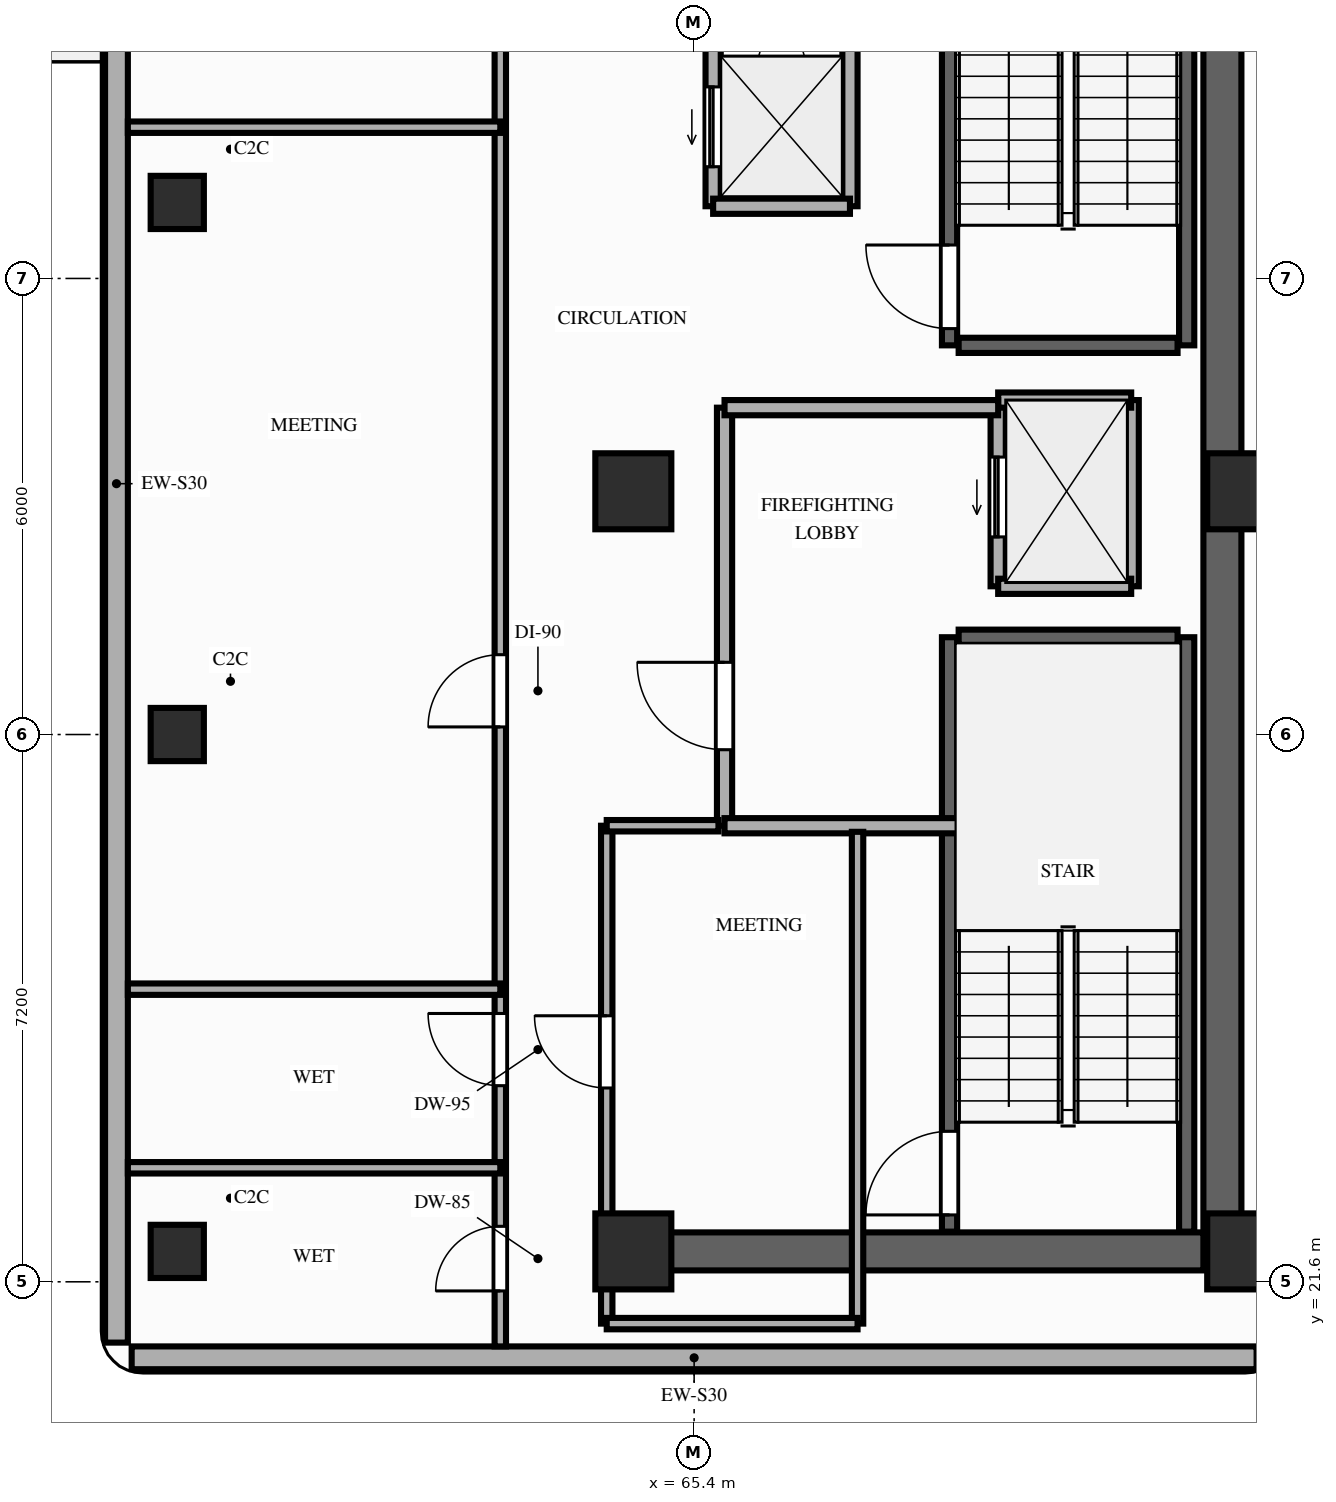
"""IFC4 building model, lengths in metres.
Left out: names, types, materials, properties, quantities, classifications, styles, units other than length and angle.
Written with IfcOpenShell. Run it as: python <this file> out.ifc"""

import sys

from ifc_helpers import new_model, si_unit, direction, frame, frame_2d, origin, origin_2d, place, context, subcontext, project, spatial, rectangle, extrude, element, fill, save


model = new_model("IFC4")
c1 = context("Model", 3, precision=1e-05, world=origin(), true_north=direction((0.0, 1.0)))
c2 = subcontext(c1, "Body", "Model", "MODEL_VIEW")
j1 = project(units=[si_unit("LENGTHUNIT", "METRE"), si_unit("PLANEANGLEUNIT", "RADIAN")], contexts=[c1])
p1 = place(None, origin())
s1 = spatial("IfcSite", under=j1, at=p1, CompositionType="ELEMENT")
p2 = place(p1, origin())
s2 = spatial("IfcBuilding", under=s1, at=p2, CompositionType="ELEMENT")
p3 = place(p2, frame((0.0, 0.0, 89.8)))
s3 = spatial("IfcBuildingStorey", under=s2, at=p3, CompositionType="ELEMENT", Elevation=89.8)
for number, where, z_axis, x_axis in (
    (1, (64.6, 22.0, 0.0), (0.0, 0.0, 1.0), (1.0, 0.0, 0.0)),
    (2, (72.65, 22.0, 0.0), (0.0, 0.0, 1.0), (1.0, 0.0, 0.0)),
    (3, (64.6, 32.0, 0.0), (0.0, 0.0, 1.0), (1.0, 0.0, 0.0)),
    (4, (72.65, 32.0, 0.0), (0.0, 0.0, 1.0), (1.0, 0.0, 0.0)),
):
    element("IfcColumn", number, at=place(p3, frame(where, z_axis=z_axis, x_axis=x_axis)), inside=s3, PredefinedType="COLUMN", context=c2, shape_type="SweptSolid", body=[
        extrude(rectangle(XDim=1.0, YDim=1.0, at=origin_2d()), origin(), (0.0, 0.0, 1.0), 3.2),
    ])
for number, where, z_axis, x_axis in (
    (5, (58.6, 22.0, 0.0), (0.0, 0.0, 1.0), (1.0, 0.0, 0.0)),
    (6, (58.6, 28.8, 0.0), (0.0, 0.0, 1.0), (1.0, 0.0, 0.0)),
    (7, (58.6, 35.8, 0.0), (0.0, 0.0, 1.0), (1.0, 0.0, 0.0)),
):
    element("IfcColumn", number, at=place(p3, frame(where, z_axis=z_axis, x_axis=x_axis)), inside=s3, PredefinedType="COLUMN", context=c2, shape_type="SweptSolid", body=[
        extrude(rectangle(XDim=0.7, YDim=0.7, at=origin_2d()), origin(), (0.0, 0.0, 1.0), 3.2),
    ])
p4 = place(p3, frame((57.8, 43.4, 0.0), z_axis=(0.0, 0.0, 1.0), x_axis=(0.0, -1.0, 0.0)))
e8 = element("IfcWall", 8, at=p4, inside=s3, PredefinedType="STANDARD", context=c2, shape_type="SweptSolid", body=[
    extrude(rectangle(XDim=22.6, YDim=0.3, at=frame_2d((11.3, 0.0))), origin(), (0.0, 0.0, 1.0), 2.73),
])
p5 = place(p4, frame((3.7, 0.0, 0.0)))
e9 = element("IfcOpeningElement", 9, at=p5, cuts=e8, PredefinedType="OPENING", context=c2, shape_type="SweptSolid", body=[
    extrude(rectangle(XDim=1.4, YDim=2.1, at=frame_2d((0.7, 1.05))), frame((0.0, 0.16, 0.0), z_axis=(0.0, -1.0, 0.0), x_axis=(1.0, 0.0, 0.0)), (0.0, 0.0, 1.0), 0.32),
])
p6 = place(p3, frame((58.0, 20.6, 0.0), z_axis=(0.0, 0.0, 1.0), x_axis=(1.0, 0.0, 0.0)))
e10 = element("IfcWall", 10, at=p6, inside=s3, PredefinedType="STANDARD", context=c2, shape_type="SweptSolid", body=[
    extrude(rectangle(XDim=14.8, YDim=0.3, at=frame_2d((7.4, 0.0))), origin(), (0.0, 0.0, 1.0), 3.02),
])
p7 = place(p3, frame((72.35, 22.0, 0.0), z_axis=(0.0, 0.0, 1.0), x_axis=(0.0, 1.0, 0.0)))
e11 = element("IfcWall", 11, at=p7, inside=s3, PredefinedType="SHEAR", context=c2, shape_type="SweptSolid", body=[
    extrude(rectangle(XDim=20.25, YDim=0.5, at=frame_2d((10.125, 0.0))), origin(), (0.0, 0.0, 1.0), 3.02),
])
p8 = place(p3, frame((64.6, 22.0, 0.0), z_axis=(0.0, 0.0, 1.0), x_axis=(1.0, 0.0, 0.0)))
e12 = element("IfcWall", 12, at=p8, inside=s3, PredefinedType="SHEAR", context=c2, shape_type="SweptSolid", body=[
    extrude(rectangle(XDim=7.5, YDim=0.5, at=frame_2d((3.75, 0.0))), origin(), (0.0, 0.0, 1.0), 3.02),
])
p9 = place(p3, frame((68.76, 22.26, 0.0), z_axis=(0.0, 0.0, 1.0), x_axis=(0.0, 1.0, 0.0)))
e13 = element("IfcWall", 13, at=p9, inside=s3, PredefinedType="SHEAR", context=c2, shape_type="SweptSolid", body=[
    extrude(rectangle(XDim=7.82, YDim=0.2, at=frame_2d((3.91, 0.0))), origin(), (0.0, 0.0, 1.0), 3.02),
])
p10 = place(p9, frame((0.22, 0.0, 0.0)))
e14 = element("IfcOpeningElement", 14, at=p10, cuts=e13, PredefinedType="OPENING", context=c2, shape_type="SweptSolid", body=[
    extrude(rectangle(XDim=1.1, YDim=2.15, at=frame_2d((0.55, 1.075))), frame((0.0, 0.11, 0.0), z_axis=(0.0, -1.0, 0.0), x_axis=(1.0, 0.0, 0.0)), (0.0, 0.0, 1.0), 0.22),
])
p11 = place(p3, frame((71.88, 22.26, 0.0), z_axis=(0.0, 0.0, 1.0), x_axis=(0.0, 1.0, 0.0)))
e15 = element("IfcWall", 15, at=p11, inside=s3, PredefinedType="SHEAR", context=c2, shape_type="SweptSolid", body=[
    extrude(rectangle(XDim=7.82, YDim=0.2, at=frame_2d((3.91, 0.0))), origin(), (0.0, 0.0, 1.0), 3.02),
])
p12 = place(p3, frame((68.88, 30.08, 0.0), z_axis=(0.0, 0.0, 1.0), x_axis=(1.0, 0.0, 0.0)))
e16 = element("IfcWall", 16, at=p12, inside=s3, PredefinedType="SHEAR", context=c2, shape_type="SweptSolid", body=[
    extrude(rectangle(XDim=2.88, YDim=0.2, at=frame_2d((1.44, 0.0))), origin(), (0.0, 0.0, 1.0), 3.02),
])
p13 = place(p3, frame((68.76, 33.92, 0.0), z_axis=(0.0, 0.0, 1.0), x_axis=(0.0, 1.0, 0.0)))
e17 = element("IfcWall", 17, at=p13, inside=s3, PredefinedType="SHEAR", context=c2, shape_type="SweptSolid", body=[
    extrude(rectangle(XDim=7.96, YDim=0.2, at=frame_2d((3.98, 0.0))), origin(), (0.0, 0.0, 1.0), 3.02),
])
p14 = place(p13, frame((0.22, 0.0, 0.0)))
e18 = element("IfcOpeningElement", 18, at=p14, cuts=e17, PredefinedType="OPENING", context=c2, shape_type="SweptSolid", body=[
    extrude(rectangle(XDim=1.1, YDim=2.15, at=frame_2d((0.55, 1.075))), frame((0.0, 0.11, 0.0), z_axis=(0.0, -1.0, 0.0), x_axis=(1.0, 0.0, 0.0)), (0.0, 0.0, 1.0), 0.22),
])
p15 = place(p3, frame((71.88, 33.92, 0.0), z_axis=(0.0, 0.0, 1.0), x_axis=(0.0, 1.0, 0.0)))
e19 = element("IfcWall", 19, at=p15, inside=s3, PredefinedType="SHEAR", context=c2, shape_type="SweptSolid", body=[
    extrude(rectangle(XDim=7.96, YDim=0.2, at=frame_2d((3.98, 0.0))), origin(), (0.0, 0.0, 1.0), 3.02),
])
p16 = place(p3, frame((68.88, 33.92, 0.0), z_axis=(0.0, 0.0, 1.0), x_axis=(1.0, 0.0, 0.0)))
e20 = element("IfcWall", 20, at=p16, inside=s3, PredefinedType="SHEAR", context=c2, shape_type="SweptSolid", body=[
    extrude(rectangle(XDim=2.88, YDim=0.2, at=frame_2d((1.44, 0.0))), origin(), (0.0, 0.0, 1.0), 3.02),
])
p17 = place(p3, frame((65.65, 35.75, 0.0), z_axis=(0.0, 0.0, 1.0), x_axis=(0.0, 1.0, 0.0)))
e21 = element("IfcWall", 21, at=p17, inside=s3, PredefinedType="MOVABLE", context=c2, shape_type="SweptSolid", body=[
    extrude(rectangle(XDim=6.05, YDim=0.2, at=frame_2d((3.025, 0.0))), origin(), (0.0, 0.0, 1.0), 3.02),
])
p18 = place(p17, frame((0.52, 0.0, 0.0)))
e22 = element("IfcOpeningElement", 22, at=p18, cuts=e21, PredefinedType="OPENING", context=c2, shape_type="SweptSolid", body=[
    extrude(rectangle(XDim=1.05, YDim=2.15, at=frame_2d((0.525, 1.075))), frame((0.0, 0.11, 0.0), z_axis=(0.0, -1.0, 0.0), x_axis=(1.0, 0.0, 0.0)), (0.0, 0.0, 1.0), 0.22),
])
p19 = place(p17, frame((2.48, 0.0, 0.0)))
e23 = element("IfcOpeningElement", 23, at=p19, cuts=e21, PredefinedType="OPENING", context=c2, shape_type="SweptSolid", body=[
    extrude(rectangle(XDim=1.05, YDim=2.15, at=frame_2d((0.525, 1.075))), frame((0.0, 0.11, 0.0), z_axis=(0.0, -1.0, 0.0), x_axis=(1.0, 0.0, 0.0)), (0.0, 0.0, 1.0), 0.22),
])
p20 = place(p17, frame((4.43, 0.0, 0.0)))
e24 = element("IfcOpeningElement", 24, at=p20, cuts=e21, PredefinedType="OPENING", context=c2, shape_type="SweptSolid", body=[
    extrude(rectangle(XDim=1.05, YDim=2.15, at=frame_2d((0.525, 1.075))), frame((0.0, 0.11, 0.0), z_axis=(0.0, -1.0, 0.0), x_axis=(1.0, 0.0, 0.0)), (0.0, 0.0, 1.0), 0.22),
])
p21 = place(p3, frame((67.45, 35.75, 0.0), z_axis=(0.0, 0.0, 1.0), x_axis=(0.0, 1.0, 0.0)))
e25 = element("IfcWall", 25, at=p21, inside=s3, PredefinedType="MOVABLE", context=c2, shape_type="SweptSolid", body=[
    extrude(rectangle(XDim=6.05, YDim=0.2, at=frame_2d((3.025, 0.0))), origin(), (0.0, 0.0, 1.0), 3.02),
])
p22 = place(p3, frame((65.65, 35.75, 0.0), z_axis=(0.0, 0.0, 1.0), x_axis=(1.0, 0.0, 0.0)))
e26 = element("IfcWall", 26, at=p22, inside=s3, PredefinedType="MOVABLE", context=c2, shape_type="SweptSolid", body=[
    extrude(rectangle(XDim=1.8, YDim=0.2, at=frame_2d((0.9, 0.0))), origin(), (0.0, 0.0, 1.0), 3.02),
])
p23 = place(p3, frame((69.4, 30.75, 0.0), z_axis=(0.0, 0.0, 1.0), x_axis=(0.0, 1.0, 0.0)))
e27 = element("IfcWall", 27, at=p23, inside=s3, PredefinedType="MOVABLE", context=c2, shape_type="SweptSolid", body=[
    extrude(rectangle(XDim=2.45, YDim=0.2, at=frame_2d((1.225, 0.0))), origin(), (0.0, 0.0, 1.0), 3.02),
])
p24 = place(p23, frame((0.65, 0.0, 0.0)))
e28 = element("IfcOpeningElement", 28, at=p24, cuts=e27, PredefinedType="OPENING", context=c2, shape_type="SweptSolid", body=[
    extrude(rectangle(XDim=1.05, YDim=2.15, at=frame_2d((0.525, 1.075))), frame((0.0, 0.11, 0.0), z_axis=(0.0, -1.0, 0.0), x_axis=(1.0, 0.0, 0.0)), (0.0, 0.0, 1.0), 0.22),
])
p25 = place(p3, frame((71.15, 30.75, 0.0), z_axis=(0.0, 0.0, 1.0), x_axis=(0.0, 1.0, 0.0)))
e29 = element("IfcWall", 29, at=p25, inside=s3, PredefinedType="MOVABLE", context=c2, shape_type="SweptSolid", body=[
    extrude(rectangle(XDim=2.45, YDim=0.2, at=frame_2d((1.225, 0.0))), origin(), (0.0, 0.0, 1.0), 3.02),
])
for number, where, z_axis, x_axis in (
    (30, (69.4, 33.2, 0.0), (0.0, 0.0, 1.0), (1.0, 0.0, 0.0)),
    (31, (69.4, 30.75, 0.0), (0.0, 0.0, 1.0), (1.0, 0.0, 0.0)),
):
    element("IfcWall", number, at=place(p3, frame(where, z_axis=z_axis, x_axis=x_axis)), inside=s3, PredefinedType="MOVABLE", context=c2, shape_type="SweptSolid", body=[
        extrude(rectangle(XDim=1.75, YDim=0.2, at=frame_2d((0.875, 0.0))), origin(), (0.0, 0.0, 1.0), 3.02),
    ])
p26 = place(p3, frame((65.8, 27.6, 0.0), z_axis=(0.0, 0.0, 1.0), x_axis=(0.0, 1.0, 0.0)))
e32 = element("IfcWall", 32, at=p26, inside=s3, PredefinedType="PARTITIONING", context=c2, shape_type="SweptSolid", body=[
    extrude(rectangle(XDim=5.5, YDim=0.2, at=frame_2d((2.75, 0.0))), origin(), (0.0, 0.0, 1.0), 3.02),
])
p27 = place(p26, frame((1.0, 0.0, 0.0)))
e33 = element("IfcOpeningElement", 33, at=p27, cuts=e32, PredefinedType="OPENING", context=c2, shape_type="SweptSolid", body=[
    extrude(rectangle(XDim=1.15, YDim=2.15, at=frame_2d((0.575, 1.075))), frame((0.0, 0.11, 0.0), z_axis=(0.0, -1.0, 0.0), x_axis=(1.0, 0.0, 0.0)), (0.0, 0.0, 1.0), 0.22),
])
p28 = place(p3, frame((65.8, 33.1, 0.0), z_axis=(0.0, 0.0, 1.0), x_axis=(1.0, 0.0, 0.0)))
e34 = element("IfcWall", 34, at=p28, inside=s3, PredefinedType="PARTITIONING", context=c2, shape_type="SweptSolid", body=[
    extrude(rectangle(XDim=3.6, YDim=0.2, at=frame_2d((1.8, 0.0))), origin(), (0.0, 0.0, 1.0), 3.02),
])
p29 = place(p3, frame((65.8, 27.6, 0.0), z_axis=(0.0, 0.0, 1.0), x_axis=(1.0, 0.0, 0.0)))
e35 = element("IfcWall", 35, at=p29, inside=s3, PredefinedType="PARTITIONING", context=c2, shape_type="SweptSolid", body=[
    extrude(rectangle(XDim=3.4, YDim=0.2, at=frame_2d((1.7, 0.0))), origin(), (0.0, 0.0, 1.0), 3.02),
])
p30 = place(p3, frame((64.25, 21.05, 0.0), z_axis=(0.0, 0.0, 1.0), x_axis=(0.0, 1.0, 0.0)))
e36 = element("IfcWall", 36, at=p30, inside=s3, PredefinedType="PARTITIONING", context=c2, shape_type="SweptSolid", body=[
    extrude(rectangle(XDim=6.55, YDim=0.15, at=frame_2d((3.275, 0.0))), origin(), (0.0, 0.0, 1.0), 2.61),
])
p31 = place(p30, frame((3.1, 0.0, 0.0)))
e37 = element("IfcOpeningElement", 37, at=p31, cuts=e36, PredefinedType="OPENING", context=c2, shape_type="SweptSolid", body=[
    extrude(rectangle(XDim=0.95, YDim=2.15, at=frame_2d((0.475, 1.075))), frame((0.0, 0.085, 0.0), z_axis=(0.0, -1.0, 0.0), x_axis=(1.0, 0.0, 0.0)), (0.0, 0.0, 1.0), 0.17),
])
p32 = place(p3, frame((67.55, 21.05, 0.0), z_axis=(0.0, 0.0, 1.0), x_axis=(0.0, 1.0, 0.0)))
e38 = element("IfcWall", 38, at=p32, inside=s3, PredefinedType="PARTITIONING", context=c2, shape_type="SweptSolid", body=[
    extrude(rectangle(XDim=6.47, YDim=0.15, at=frame_2d((3.235, 0.0))), origin(), (0.0, 0.0, 1.0), 2.61),
])
p33 = place(p3, frame((64.25, 21.05, 0.0), z_axis=(0.0, 0.0, 1.0), x_axis=(1.0, 0.0, 0.0)))
e39 = element("IfcWall", 39, at=p33, inside=s3, PredefinedType="PARTITIONING", context=c2, shape_type="SweptSolid", body=[
    extrude(rectangle(XDim=3.3, YDim=0.15, at=frame_2d((1.65, 0.0))), origin(), (0.0, 0.0, 1.0), 3.02),
])
p34 = place(p3, frame((64.25, 27.6, 0.0), z_axis=(0.0, 0.0, 1.0), x_axis=(1.0, 0.0, 0.0)))
e40 = element("IfcWall", 40, at=p34, inside=s3, PredefinedType="PARTITIONING", context=c2, shape_type="SweptSolid", body=[
    extrude(rectangle(XDim=1.47, YDim=0.15, at=frame_2d((0.735, 0.0))), origin(), (0.0, 0.0, 1.0), 2.61),
])
p35 = place(p3, frame((62.85, 20.75, 0.0), z_axis=(0.0, 0.0, 1.0), x_axis=(0.0, 1.0, 0.0)))
e41 = element("IfcWall", 41, at=p35, inside=s3, PredefinedType="PARTITIONING", context=c2, shape_type="SweptSolid", body=[
    extrude(rectangle(XDim=22.7, YDim=0.15, at=frame_2d((11.35, 0.0))), origin(), (0.0, 0.0, 1.0), 2.61),
])
p36 = place(p35, frame((0.73, 0.0, 0.0)))
e42 = element("IfcOpeningElement", 42, at=p36, cuts=e41, PredefinedType="OPENING", context=c2, shape_type="SweptSolid", body=[
    extrude(rectangle(XDim=0.85, YDim=2.1, at=frame_2d((0.425, 1.05))), frame((0.0, 0.085, 0.0), z_axis=(0.0, -1.0, 0.0), x_axis=(1.0, 0.0, 0.0)), (0.0, 0.0, 1.0), 0.17),
])
p37 = place(p35, frame((3.43, 0.0, 0.0)))
e43 = element("IfcOpeningElement", 43, at=p37, cuts=e41, PredefinedType="OPENING", context=c2, shape_type="SweptSolid", body=[
    extrude(rectangle(XDim=0.95, YDim=2.1, at=frame_2d((0.475, 1.05))), frame((0.0, 0.085, 0.0), z_axis=(0.0, -1.0, 0.0), x_axis=(1.0, 0.0, 0.0)), (0.0, 0.0, 1.0), 0.17),
])
p38 = place(p35, frame((8.15, 0.0, 0.0)))
e44 = element("IfcOpeningElement", 44, at=p38, cuts=e41, PredefinedType="OPENING", context=c2, shape_type="SweptSolid", body=[
    extrude(rectangle(XDim=0.95, YDim=2.15, at=frame_2d((0.475, 1.075))), frame((0.0, 0.085, 0.0), z_axis=(0.0, -1.0, 0.0), x_axis=(1.0, 0.0, 0.0)), (0.0, 0.0, 1.0), 0.17),
])
p39 = place(p35, frame((18.89, 0.0, 0.0)))
e45 = element("IfcOpeningElement", 45, at=p39, cuts=e41, PredefinedType="OPENING", context=c2, shape_type="SweptSolid", body=[
    extrude(rectangle(XDim=0.95, YDim=2.15, at=frame_2d((0.475, 1.075))), frame((0.0, 0.085, 0.0), z_axis=(0.0, -1.0, 0.0), x_axis=(1.0, 0.0, 0.0)), (0.0, 0.0, 1.0), 0.17),
])
for number, where, z_axis, x_axis in (
    (46, (57.95, 23.1, 0.0), (0.0, 0.0, 1.0), (1.0, 0.0, 0.0)),
    (47, (57.95, 25.45, 0.0), (0.0, 0.0, 1.0), (1.0, 0.0, 0.0)),
    (48, (57.95, 36.79, 0.0), (0.0, 0.0, 1.0), (1.0, 0.0, 0.0)),
):
    element("IfcWall", number, at=place(p3, frame(where, z_axis=z_axis, x_axis=x_axis)), inside=s3, PredefinedType="PARTITIONING", context=c2, shape_type="SweptSolid", body=[
        extrude(rectangle(XDim=4.9, YDim=0.15, at=frame_2d((2.45, 0.0))), origin(), (0.0, 0.0, 1.0), 2.61),
    ])
p40 = place(p10, origin())
e49 = element("IfcDoor", 49, at=p40, inside=s3, OperationType="SINGLE_SWING_LEFT", PredefinedType="DOOR", context=c2, shape_type="SweptSolid", body=[
    extrude(rectangle(XDim=1.1, YDim=2.15, at=frame_2d((0.55, 1.075))), frame((0.0, 0.025, 0.0), z_axis=(0.0, -1.0, 0.0), x_axis=(1.0, 0.0, 0.0)), (0.0, 0.0, 1.0), 0.05),
])
fill(e14, e49)
p41 = place(p14, origin())
e50 = element("IfcDoor", 50, at=p41, inside=s3, OperationType="SINGLE_SWING_RIGHT", PredefinedType="DOOR", context=c2, shape_type="SweptSolid", body=[
    extrude(rectangle(XDim=1.1, YDim=2.15, at=frame_2d((0.55, 1.075))), frame((0.0, 0.025, 0.0), z_axis=(0.0, -1.0, 0.0), x_axis=(1.0, 0.0, 0.0)), (0.0, 0.0, 1.0), 0.05),
])
fill(e18, e50)
p42 = place(p18, origin())
e51 = element("IfcDoor", 51, at=p42, inside=s3, OperationType="SLIDING_TO_LEFT", PredefinedType="DOOR", context=c2, shape_type="SweptSolid", body=[
    extrude(rectangle(XDim=1.05, YDim=2.15, at=frame_2d((0.525, 1.075))), frame((0.0, 0.025, 0.0), z_axis=(0.0, -1.0, 0.0), x_axis=(1.0, 0.0, 0.0)), (0.0, 0.0, 1.0), 0.05),
])
fill(e22, e51)
p43 = place(p24, origin())
e52 = element("IfcDoor", 52, at=p43, inside=s3, OperationType="SLIDING_TO_LEFT", PredefinedType="DOOR", context=c2, shape_type="SweptSolid", body=[
    extrude(rectangle(XDim=1.05, YDim=2.15, at=frame_2d((0.525, 1.075))), frame((0.0, 0.025, 0.0), z_axis=(0.0, -1.0, 0.0), x_axis=(1.0, 0.0, 0.0)), (0.0, 0.0, 1.0), 0.05),
])
fill(e28, e52)
p44 = place(p27, origin())
e53 = element("IfcDoor", 53, at=p44, inside=s3, OperationType="SINGLE_SWING_RIGHT", PredefinedType="DOOR", context=c2, shape_type="SweptSolid", body=[
    extrude(rectangle(XDim=1.15, YDim=2.15, at=frame_2d((0.575, 1.075))), frame((0.0, 0.025, 0.0), z_axis=(0.0, -1.0, 0.0), x_axis=(1.0, 0.0, 0.0)), (0.0, 0.0, 1.0), 0.05),
])
fill(e33, e53)
p45 = place(p31, origin())
e54 = element("IfcDoor", 54, at=p45, inside=s3, OperationType="SINGLE_SWING_RIGHT", PredefinedType="DOOR", context=c2, shape_type="SweptSolid", body=[
    extrude(rectangle(XDim=0.95, YDim=2.15, at=frame_2d((0.475, 1.075))), frame((0.0, 0.025, 0.0), z_axis=(0.0, -1.0, 0.0), x_axis=(1.0, 0.0, 0.0)), (0.0, 0.0, 1.0), 0.05),
])
fill(e37, e54)
p46 = place(p36, origin())
e55 = element("IfcDoor", 55, at=p46, inside=s3, OperationType="SINGLE_SWING_LEFT", PredefinedType="DOOR", context=c2, shape_type="SweptSolid", body=[
    extrude(rectangle(XDim=0.85, YDim=2.1, at=frame_2d((0.425, 1.05))), frame((0.0, 0.025, 0.0), z_axis=(0.0, -1.0, 0.0), x_axis=(1.0, 0.0, 0.0)), (0.0, 0.0, 1.0), 0.05),
])
fill(e42, e55)
p47 = place(p37, origin())
e56 = element("IfcDoor", 56, at=p47, inside=s3, OperationType="SINGLE_SWING_RIGHT", PredefinedType="DOOR", context=c2, shape_type="SweptSolid", body=[
    extrude(rectangle(XDim=0.95, YDim=2.1, at=frame_2d((0.475, 1.05))), frame((0.0, 0.025, 0.0), z_axis=(0.0, -1.0, 0.0), x_axis=(1.0, 0.0, 0.0)), (0.0, 0.0, 1.0), 0.05),
])
fill(e43, e56)
p48 = place(p38, origin())
e57 = element("IfcDoor", 57, at=p48, inside=s3, OperationType="SINGLE_SWING_LEFT", PredefinedType="DOOR", context=c2, shape_type="SweptSolid", body=[
    extrude(rectangle(XDim=0.95, YDim=2.15, at=frame_2d((0.475, 1.075))), frame((0.0, 0.025, 0.0), z_axis=(0.0, -1.0, 0.0), x_axis=(1.0, 0.0, 0.0)), (0.0, 0.0, 1.0), 0.05),
])
fill(e44, e57)
save(model, sys.argv[1])
